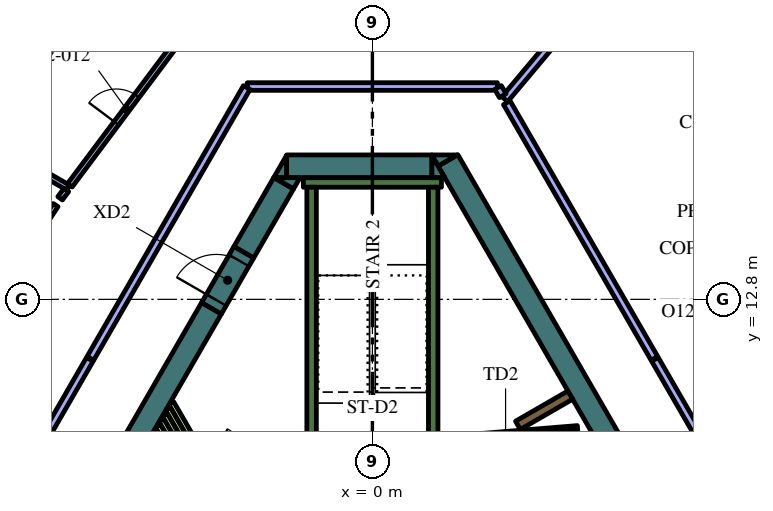
"""IFC4 building model, lengths in metres.
Left out: names, types, materials, properties, quantities, classifications, styles, units other than length and angle.
Written with IfcOpenShell. Run it as: python <this file> out.ifc"""

import sys

from ifc_helpers import new_model, si_unit, direction, frame, frame_2d, origin, place, context, subcontext, project, spatial, polyline, rectangle, outline, extrude, element, fill, save


model = new_model("IFC4")
c1 = context("Model", 3, precision=1e-05, world=origin(), true_north=direction((0.0, 1.0)))
c2 = subcontext(c1, "Body", "Model", "MODEL_VIEW")
j1 = project(units=[si_unit("LENGTHUNIT", "METRE"), si_unit("PLANEANGLEUNIT", "RADIAN")], contexts=[c1])
p1 = place(None, origin())
s1 = spatial("IfcSite", under=j1, at=p1, CompositionType="ELEMENT")
p2 = place(p1, origin())
s2 = spatial("IfcBuilding", under=s1, at=p2, CompositionType="ELEMENT")
p3 = place(p2, frame((0.0, 0.0, 279.6)))
s3 = spatial("IfcBuildingStorey", under=s2, at=p3, CompositionType="ELEMENT", Elevation=279.6)
p4 = place(p3, frame((1.989, 16.456, 0.0), z_axis=(0.0, 0.0, 1.0), x_axis=(0.49999102663, -0.8660305845, 0.0)))
e1 = element("IfcWall", 1, at=p4, inside=s3, PredefinedType="SOLIDWALL", context=c2, shape_type="SweptSolid", body=[
    extrude(rectangle(XDim=12.406, YDim=0.6, at=frame_2d((6.203, 0.0))), origin(), (0.0, 0.0, 1.0), 4.2),
])
p5 = place(p3, origin())
e2 = element("IfcWall", 2, at=p5, inside=s3, PredefinedType="SOLIDWALL", context=c2, shape_type="SweptSolid", body=[
    extrude(outline(polyline([(1.559, 16.6), (2.235, 16.6), (1.728, 16.307), (1.559, 16.6)])), origin(), (0.0, 0.0, 1.0), 4.2),
])
p6 = place(p3, frame((-2.258, 16.3, 0.0), z_axis=(0.0, 0.0, 1.0), x_axis=(1.0, 0.0, 0.0)))
e3 = element("IfcWall", 3, at=p6, inside=s3, PredefinedType="SOLIDWALL", context=c2, shape_type="SweptSolid", body=[
    extrude(rectangle(XDim=3.823, YDim=0.6, at=frame_2d((1.912, 0.0))), origin(), (0.0, 0.0, 1.0), 4.2),
])
e4 = element("IfcWall", 4, at=p5, inside=s3, PredefinedType="SOLIDWALL", context=c2, shape_type="SweptSolid", body=[
    extrude(outline(polyline([(1.905, 16.0), (1.567, 16.0), (1.567, 16.585), (1.905, 16.0)])), origin(), (0.0, 0.0, 1.0), 4.2),
])
e5 = element("IfcWall", 5, at=p5, inside=s3, PredefinedType="SOLIDWALL", context=c2, shape_type="SweptSolid", body=[
    extrude(outline(polyline([(-2.598, 16.0), (-2.26, 16.585), (-2.26, 16.0), (-2.598, 16.0)])), origin(), (0.0, 0.0, 1.0), 4.2),
])
p7 = place(p3, frame((-2.335, 15.855, 0.0), z_axis=(0.0, 0.0, 1.0), x_axis=(-0.499980971027, -0.866036389889, 0.0)))
e6 = element("IfcWall", 6, at=p7, inside=s3, PredefinedType="SOLIDWALL", context=c2, shape_type="SweptSolid", body=[
    extrude(rectangle(XDim=2.098, YDim=0.6, at=frame_2d((1.049, 0.0))), origin(), (0.0, 0.0, 1.0), 4.2),
])
e7 = element("IfcWall", 7, at=p5, inside=s3, PredefinedType="SOLIDWALL", context=c2, shape_type="SweptSolid", body=[
    extrude(outline(polyline([(-1.905, 16.0), (-2.074, 15.707), (-2.581, 16.0), (-1.905, 16.0)])), origin(), (0.0, 0.0, 1.0), 4.2),
])
p8 = place(p3, frame((-4.234, 12.566, 0.0), z_axis=(0.0, 0.0, 1.0), x_axis=(-0.499998841866, -0.866026072432, 0.0)))
e8 = element("IfcWall", 8, at=p8, inside=s3, PredefinedType="SOLIDWALL", context=c2, shape_type="SweptSolid", body=[
    extrude(rectangle(XDim=16.694, YDim=0.6, at=frame_2d((8.347, 0.0))), origin(), (0.0, 0.0, 1.0), 4.2),
])
p9 = place(p3, frame((-1.817, 15.875, 0.0), z_axis=(0.0, 0.0, 1.0), x_axis=(1.0, 0.0, 0.0)))
e9 = element("IfcWall", 9, at=p9, inside=s3, PredefinedType="SOLIDWALL", context=c2, shape_type="SweptSolid", body=[
    extrude(rectangle(XDim=3.634, YDim=0.25, at=frame_2d((1.817, 0.0))), origin(), (0.0, 0.0, 1.0), 4.2),
])
p10 = place(p3, frame((1.6, 8.95, 0.0), z_axis=(0.0, 0.0, 1.0), x_axis=(0.0, 1.0, 0.0)))
e10 = element("IfcWall", 10, at=p10, inside=s3, PredefinedType="SOLIDWALL", context=c2, shape_type="SweptSolid", body=[
    extrude(rectangle(XDim=6.8, YDim=0.25, at=frame_2d((3.4, 0.0))), origin(), (0.0, 0.0, 1.0), 4.2),
])
p11 = place(p3, frame((-1.6, 8.7, 0.0), z_axis=(0.0, 0.0, 1.0), x_axis=(0.0, 1.0, 0.0)))
e11 = element("IfcWall", 11, at=p11, inside=s3, PredefinedType="SOLIDWALL", context=c2, shape_type="SweptSolid", body=[
    extrude(rectangle(XDim=7.05, YDim=0.25, at=frame_2d((3.525, 0.0))), origin(), (0.0, 0.0, 1.0), 4.2),
])
p12 = place(p3, frame((3.83, 9.486, 0.0), z_axis=(0.0, 0.0, 1.0), x_axis=(0.865986202621, 0.500067892261, 0.0)))
e12 = element("IfcWall", 12, at=p12, inside=s3, PredefinedType="SOLIDWALL", context=c2, shape_type="SweptSolid", body=[
    extrude(rectangle(XDim=1.591, YDim=0.25, at=frame_2d((0.795, 0.0))), origin(), (0.0, 0.0, 1.0), 4.2),
])
p13 = place(p3, frame((-5.294, 10.067, 0.0), z_axis=(0.0, 0.0, 1.0), x_axis=(0.500054140411, -0.865994143547, 0.0)))
e13 = element("IfcWall", 13, at=p13, inside=s3, PredefinedType="PARTITIONING", context=c2, shape_type="SweptSolid", body=[
    extrude(rectangle(XDim=1.529, YDim=0.15, at=frame_2d((0.765, 0.0))), origin(), (0.0, 0.0, 1.0), 3.55),
])
p14 = place(p3, frame((-5.381, 9.917, 0.0), z_axis=(0.0, 0.0, 1.0), x_axis=(0.500136970483, -0.865946309396, 0.0)))
e14 = element("IfcWall", 14, at=p14, inside=s3, PredefinedType="PARTITIONING", context=c2, shape_type="SweptSolid", body=[
    extrude(rectangle(XDim=1.359, YDim=0.15, at=frame_2d((0.68, 0.0))), origin(), (0.0, 0.0, 1.0), 3.55),
])
p15 = place(p3, frame((-5.467, 9.767, 0.0), z_axis=(0.0, 0.0, 1.0), x_axis=(0.500168849293, -0.86592789665, 0.0)))
e15 = element("IfcWall", 15, at=p15, inside=s3, PredefinedType="PARTITIONING", context=c2, shape_type="SweptSolid", body=[
    extrude(rectangle(XDim=1.01, YDim=0.15, at=frame_2d((0.505, 0.0))), origin(), (0.0, 0.0, 1.0), 3.55),
])
p16 = place(p3, frame((-5.554, 9.617, 0.0), z_axis=(0.0, 0.0, 1.0), x_axis=(0.500253084543, -0.86587923604, 0.0)))
e16 = element("IfcWall", 16, at=p16, inside=s3, PredefinedType="PARTITIONING", context=c2, shape_type="SweptSolid", body=[
    extrude(rectangle(XDim=0.664, YDim=0.15, at=frame_2d((0.332, 0.0))), origin(), (0.0, 0.0, 1.0), 3.55),
])
p17 = place(p3, frame((-5.64, 9.467, 0.0), z_axis=(0.0, 0.0, 1.0), x_axis=(0.499944387978, -0.86605750902, 0.0)))
e17 = element("IfcWall", 17, at=p17, inside=s3, PredefinedType="PARTITIONING", context=c2, shape_type="SweptSolid", body=[
    extrude(rectangle(XDim=0.317, YDim=0.15, at=frame_2d((0.159, 0.0))), origin(), (0.0, 0.0, 1.0), 3.55),
])
p18 = place(p3, frame((5.398, 9.419, 0.0), z_axis=(0.0, 0.0, 1.0), x_axis=(-0.996653416376, -0.081743303248, 0.0)))
e18 = element("IfcWall", 18, at=p18, inside=s3, PredefinedType="PARTITIONING", context=c2, shape_type="SweptSolid", body=[
    extrude(rectangle(XDim=2.7, YDim=0.12, at=frame_2d((1.35, 0.0))), origin(), (0.0, 0.0, 1.0), 3.55),
])
p19 = place(p18, frame((1.45, 0.0, 0.0)))
e19 = element("IfcOpeningElement", 19, at=p19, cuts=e18, PredefinedType="OPENING", context=c2, shape_type="SweptSolid", body=[
    extrude(rectangle(XDim=0.9, YDim=2.1, at=frame_2d((0.45, 1.05))), frame((0.0, 0.07, 0.0), z_axis=(0.0, -1.0, 0.0), x_axis=(1.0, 0.0, 0.0)), (0.0, 0.0, 1.0), 0.14),
])
p20 = place(p3, frame((-4.234, 12.566, 0.0), z_axis=(0.0, 0.0, 1.0), x_axis=(0.500000056704, 0.866025371046, 0.0)))
e20 = element("IfcWall", 20, at=p20, inside=s3, PredefinedType="SOLIDWALL", context=c2, shape_type="SweptSolid", body=[
    extrude(rectangle(XDim=1.7, YDim=0.6, at=frame_2d((0.85, 0.0))), origin(), (0.0, 0.0, 1.0), 4.2),
])
p21 = place(p20, frame((0.25, 0.0, 0.0)))
e21 = element("IfcOpeningElement", 21, at=p21, cuts=e20, PredefinedType="OPENING", context=c2, shape_type="SweptSolid", body=[
    extrude(rectangle(XDim=1.2, YDim=2.1, at=frame_2d((0.6, 1.05))), frame((0.0, 0.31, 0.0), z_axis=(0.0, -1.0, 0.0), x_axis=(1.0, 0.0, 0.0)), (0.0, 0.0, 1.0), 0.62),
])
p22 = place(p3, frame((3.483, 18.067, 0.0), z_axis=(0.0, 0.0, 1.0), x_axis=(0.642896944312, 0.765952687177, 0.0)))
e22 = element("IfcWall", 22, at=p22, inside=s3, PredefinedType="PARTITIONING", context=c2, shape_type="SweptSolid", body=[
    extrude(rectangle(XDim=2.29, YDim=0.2, at=frame_2d((1.145, 0.0))), origin(), (0.0, 0.0, 1.0), 3.55),
])
p23 = place(p3, frame((8.792, 8.873, 0.0), z_axis=(0.0, 0.0, 1.0), x_axis=(-0.499992600721, 0.866029675718, 0.0)))
e23 = element("IfcWall", 23, at=p23, inside=s3, PredefinedType="PARTITIONING", context=c2, shape_type="SweptSolid", body=[
    extrude(rectangle(XDim=2.712, YDim=0.2, at=frame_2d((1.356, 0.0))), origin(), (0.0, 0.0, 1.0), 3.55),
])
p24 = place(p3, frame((7.421, 11.247, 0.0), z_axis=(0.0, 0.0, 1.0), x_axis=(-0.499999024953, 0.866025966727, 0.0)))
e24 = element("IfcWall", 24, at=p24, inside=s3, PredefinedType="PARTITIONING", context=c2, shape_type="SweptSolid", body=[
    extrude(rectangle(XDim=7.769, YDim=0.2, at=frame_2d((3.884, 0.0))), origin(), (0.0, 0.0, 1.0), 3.55),
])
p25 = place(p3, frame((-8.007, 15.74, 0.0), z_axis=(0.0, 0.0, 1.0), x_axis=(-0.866044607523, 0.499966736674, 0.0)))
e25 = element("IfcWall", 25, at=p25, inside=s3, PredefinedType="PARTITIONING", context=c2, shape_type="SweptSolid", body=[
    extrude(rectangle(XDim=3.115, YDim=0.15, at=frame_2d((1.557, 0.0))), origin(), (0.0, 0.0, 1.0), 3.55),
])
p26 = place(p3, frame((-7.962, 15.8, 0.0), z_axis=(0.0, 0.0, 1.0), x_axis=(0.599541489613, 0.800343677574, 0.0)))
e26 = element("IfcWall", 26, at=p26, inside=s3, PredefinedType="PARTITIONING", context=c2, shape_type="SweptSolid", body=[
    extrude(rectangle(XDim=4.942, YDim=0.15, at=frame_2d((2.471, 0.0))), origin(), (0.0, 0.0, 1.0), 3.55),
])
p27 = place(p26, frame((2.042, 0.0, 0.0)))
e27 = element("IfcOpeningElement", 27, at=p27, cuts=e26, PredefinedType="OPENING", context=c2, shape_type="SweptSolid", body=[
    extrude(rectangle(XDim=0.9, YDim=2.1, at=frame_2d((0.45, 1.05))), frame((0.0, 0.085, 0.0), z_axis=(0.0, -1.0, 0.0), x_axis=(1.0, 0.0, 0.0)), (0.0, 0.0, 1.0), 0.17),
])
p28 = place(p3, frame((-8.052, 15.679, 0.0), z_axis=(0.0, 0.0, 1.0), x_axis=(-0.599004157744, -0.800745914136, 0.0)))
e28 = element("IfcWall", 28, at=p28, inside=s3, PredefinedType="PARTITIONING", context=c2, shape_type="SweptSolid", body=[
    extrude(rectangle(XDim=0.275, YDim=0.15, at=frame_2d((0.137, 0.0))), origin(), (0.0, 0.0, 1.0), 3.55),
])
p29 = place(p3, frame((-11.523, 10.449, 0.0), z_axis=(0.0, 0.0, 1.0), x_axis=(0.550751709023, 0.834669129061, 0.0)))
e29 = element("IfcWall", 29, at=p29, inside=s3, PredefinedType="PARTITIONING", context=c2, shape_type="SweptSolid", body=[
    extrude(rectangle(XDim=5.788, YDim=0.15, at=frame_2d((2.894, 0.0))), origin(), (0.0, 0.0, 1.0), 3.55),
])
p30 = place(p29, frame((2.488, 0.0, 0.0)))
e30 = element("IfcOpeningElement", 30, at=p30, cuts=e29, PredefinedType="OPENING", context=c2, shape_type="SweptSolid", body=[
    extrude(rectangle(XDim=0.9, YDim=2.1, at=frame_2d((0.45, 1.05))), frame((0.0, 0.085, 0.0), z_axis=(0.0, -1.0, 0.0), x_axis=(1.0, 0.0, 0.0)), (0.0, 0.0, 1.0), 0.17),
])
p31 = place(p3, frame((-7.436, 11.221, 0.0), z_axis=(0.0, 0.0, 1.0), x_axis=(-0.49999894854, -0.866026010844, 0.0)))
e31 = element("IfcWall", 31, at=p31, inside=s3, PredefinedType="PARTITIONING", context=c2, shape_type="SweptSolid", body=[
    extrude(rectangle(XDim=12.0, YDim=0.2, at=frame_2d((6.0, 0.0))), origin(), (0.0, 0.0, 1.0), 3.55),
])
p32 = place(p31, frame((5.5, 0.0, 0.0)))
e32 = element("IfcOpeningElement", 32, at=p32, cuts=e31, PredefinedType="OPENING", context=c2, shape_type="SweptSolid", body=[
    extrude(rectangle(XDim=1.0, YDim=2.1, at=frame_2d((0.5, 1.05))), frame((0.0, 0.11, 0.0), z_axis=(0.0, -1.0, 0.0), x_axis=(1.0, 0.0, 0.0)), (0.0, 0.0, 1.0), 0.22),
])
p33 = place(p3, frame((3.291, 18.4, 0.0), z_axis=(0.0, 0.0, 1.0), x_axis=(-1.0, 0.0, 0.0)))
e33 = element("IfcWall", 33, at=p33, inside=s3, PredefinedType="PARTITIONING", context=c2, shape_type="SweptSolid", body=[
    extrude(rectangle(XDim=6.582, YDim=0.2, at=frame_2d((3.291, 0.0))), origin(), (0.0, 0.0, 1.0), 3.55),
])
p34 = place(p3, frame((-3.306, 18.374, 0.0), z_axis=(0.0, 0.0, 1.0), x_axis=(-0.499999798456, -0.866025520146, 0.0)))
e34 = element("IfcWall", 34, at=p34, inside=s3, PredefinedType="PARTITIONING", context=c2, shape_type="SweptSolid", body=[
    extrude(rectangle(XDim=8.229, YDim=0.2, at=frame_2d((4.115, 0.0))), origin(), (0.0, 0.0, 1.0), 3.55),
])
p35 = place(p3, frame((3.43, 18.159, 0.0), z_axis=(0.0, 0.0, 1.0), x_axis=(-0.499949632511, 0.866054481515, 0.0)))
e35 = element("IfcWall", 35, at=p35, inside=s3, PredefinedType="PARTITIONING", context=c2, shape_type="SweptSolid", body=[
    extrude(rectangle(XDim=0.248, YDim=0.2, at=frame_2d((0.124, 0.0))), origin(), (0.0, 0.0, 1.0), 3.55),
])
p36 = place(p3, frame((10.938, 17.99, 0.0), z_axis=(0.0, 0.0, 1.0), x_axis=(-0.599559865294, 0.800329911929, 0.0)))
e36 = element("IfcWall", 36, at=p36, inside=s3, PredefinedType="SOLIDWALL", context=c2, shape_type="SweptSolid", body=[
    extrude(rectangle(XDim=5.415, YDim=0.19, at=frame_2d((2.708, 0.0))), origin(), (0.0, 0.0, 1.0), 3.95),
])
p37 = place(p36, frame((0.358, 0.0, 0.6)))
e37 = element("IfcOpeningElement", 37, at=p37, cuts=e36, PredefinedType="OPENING", context=c2, shape_type="SweptSolid", body=[
    extrude(rectangle(XDim=1.5, YDim=2.85, at=frame_2d((0.75, 1.425))), frame((0.0, 0.105, 0.0), z_axis=(0.0, -1.0, 0.0), x_axis=(1.0, 0.0, 0.0)), (0.0, 0.0, 1.0), 0.21),
])
p38 = place(p36, frame((3.593, 0.0, 0.6)))
e38 = element("IfcOpeningElement", 38, at=p38, cuts=e36, PredefinedType="OPENING", context=c2, shape_type="SweptSolid", body=[
    extrude(rectangle(XDim=1.5, YDim=2.85, at=frame_2d((0.75, 1.425))), frame((0.0, 0.105, 0.0), z_axis=(0.0, -1.0, 0.0), x_axis=(1.0, 0.0, 0.0)), (0.0, 0.0, 1.0), 0.21),
])
p39 = place(p3, frame((-7.692, 22.324, 0.0), z_axis=(0.0, 0.0, 1.0), x_axis=(-0.599559865294, -0.800329911929, 0.0)))
e39 = element("IfcWall", 39, at=p39, inside=s3, PredefinedType="SOLIDWALL", context=c2, shape_type="SweptSolid", body=[
    extrude(rectangle(XDim=5.415, YDim=0.19, at=frame_2d((2.708, 0.0))), origin(), (0.0, 0.0, 1.0), 3.95),
])
p40 = place(p39, frame((0.323, 0.0, 0.6)))
e40 = element("IfcOpeningElement", 40, at=p40, cuts=e39, PredefinedType="OPENING", context=c2, shape_type="SweptSolid", body=[
    extrude(rectangle(XDim=1.5, YDim=2.85, at=frame_2d((0.75, 1.425))), frame((0.0, 0.105, 0.0), z_axis=(0.0, -1.0, 0.0), x_axis=(1.0, 0.0, 0.0)), (0.0, 0.0, 1.0), 0.21),
])
p41 = place(p39, frame((3.558, 0.0, 0.6)))
e41 = element("IfcOpeningElement", 41, at=p41, cuts=e39, PredefinedType="OPENING", context=c2, shape_type="SweptSolid", body=[
    extrude(rectangle(XDim=1.5, YDim=2.85, at=frame_2d((0.75, 1.425))), frame((0.0, 0.105, 0.0), z_axis=(0.0, -1.0, 0.0), x_axis=(1.0, 0.0, 0.0)), (0.0, 0.0, 1.0), 0.21),
])
p42 = place(p19, origin())
e42 = element("IfcDoor", 42, at=p42, inside=s3, OperationType="SINGLE_SWING_LEFT", PredefinedType="DOOR", context=c2, shape_type="SweptSolid", body=[
    extrude(rectangle(XDim=0.9, YDim=2.1, at=frame_2d((0.45, 1.05))), frame((0.0, 0.025, 0.0), z_axis=(0.0, -1.0, 0.0), x_axis=(1.0, 0.0, 0.0)), (0.0, 0.0, 1.0), 0.05),
])
fill(e19, e42)
p43 = place(p21, origin())
e43 = element("IfcDoor", 43, at=p43, inside=s3, OperationType="SINGLE_SWING_LEFT", PredefinedType="DOOR", context=c2, shape_type="SweptSolid", body=[
    extrude(rectangle(XDim=1.2, YDim=2.1, at=frame_2d((0.6, 1.05))), frame((0.0, 0.025, 0.0), z_axis=(0.0, -1.0, 0.0), x_axis=(1.0, 0.0, 0.0)), (0.0, 0.0, 1.0), 0.05),
])
fill(e21, e43)
p44 = place(p27, origin())
e44 = element("IfcDoor", 44, at=p44, inside=s3, OperationType="SINGLE_SWING_RIGHT", PredefinedType="DOOR", context=c2, shape_type="SweptSolid", body=[
    extrude(rectangle(XDim=0.9, YDim=2.1, at=frame_2d((0.45, 1.05))), frame((0.0, 0.025, 0.0), z_axis=(0.0, -1.0, 0.0), x_axis=(1.0, 0.0, 0.0)), (0.0, 0.0, 1.0), 0.05),
])
fill(e27, e44)
save(model, sys.argv[1])
